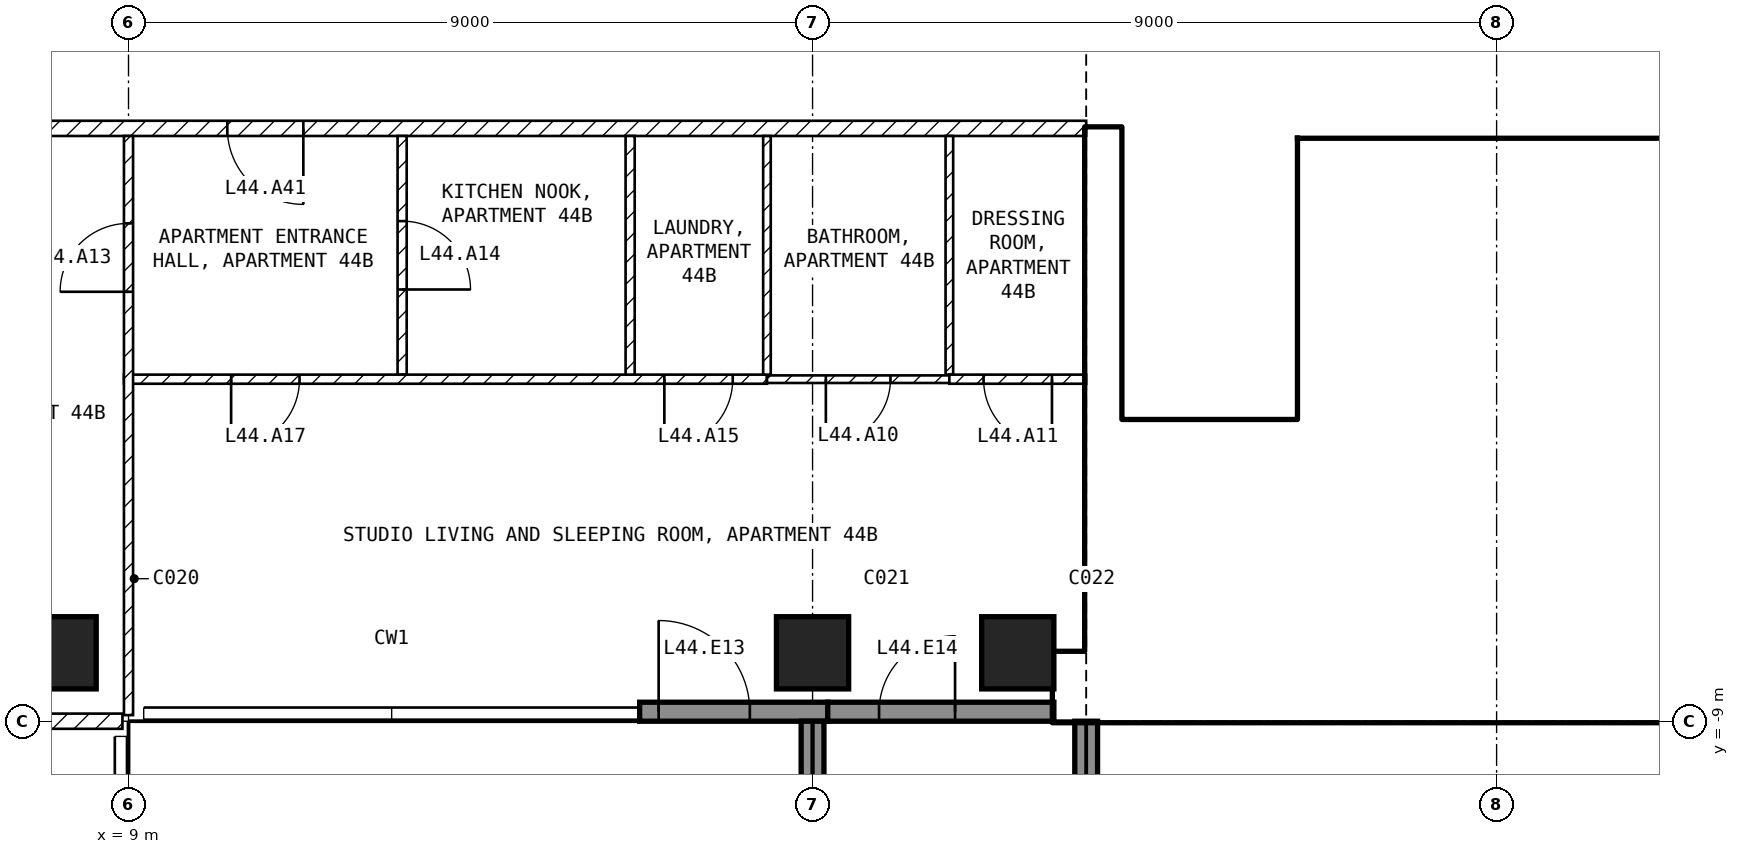
"""IFC4 building model, lengths in metres.
Left out: names, types, materials, properties, quantities, classifications, styles, units other than length and angle.
Written with IfcOpenShell. Run it as: python <this file> out.ifc"""

import sys

from ifc_helpers import new_model, si_unit, direction, frame, frame_2d, origin, origin_2d, place, context, subcontext, project, spatial, rectangle, extrude, element, fill, save


model = new_model("IFC4")
c1 = context("Model", 3, precision=1e-05, world=origin(), true_north=direction((0.0, 1.0)))
c2 = subcontext(c1, "Body", "Model", "MODEL_VIEW")
j1 = project(units=[si_unit("LENGTHUNIT", "METRE"), si_unit("PLANEANGLEUNIT", "RADIAN")], contexts=[c1])
p1 = place(None, origin())
s1 = spatial("IfcSite", under=j1, at=p1, CompositionType="ELEMENT")
p2 = place(p1, origin())
s2 = spatial("IfcBuilding", under=s1, at=p2, CompositionType="ELEMENT")
p3 = place(p2, frame((0.0, 0.0, 180.6)))
s3 = spatial("IfcBuildingStorey", under=s2, at=p3, CompositionType="ELEMENT", Elevation=180.6)
for number, where, z_axis, x_axis in (
    (1, (8.1, -8.1, -0.25), (0.0, 0.0, 1.0), (1.0, 0.0, 0.0)),
    (2, (18.0, -8.1, -0.25), (0.0, 0.0, 1.0), (1.0, 0.0, 0.0)),
    (3, (20.7, -8.1, -0.25), (0.0, 0.0, 1.0), (1.0, 0.0, 0.0)),
):
    element("IfcColumn", number, at=place(p3, frame(where, z_axis=z_axis, x_axis=x_axis)), inside=s3, PredefinedType="COLUMN", context=c2, shape_type="SweptSolid", body=[
        extrude(rectangle(XDim=0.95, YDim=0.95, at=origin_2d()), origin(), (0.0, 0.0, 1.0), 3.5),
    ])
p4 = place(p3, frame((15.725, -8.875, 0.0), z_axis=(0.0, 0.0, 1.0), x_axis=(1.0, 0.0, 0.0)))
e4 = element("IfcWall", 4, at=p4, inside=s3, PredefinedType="SOLIDWALL", context=c2, shape_type="SweptSolid", body=[
    extrude(rectangle(XDim=2.475, YDim=0.25, at=frame_2d((1.237, 0.0))), origin(), (0.0, 0.0, 1.0), 3.25),
])
p5 = place(p4, frame((0.25, 0.0, 0.0)))
e5 = element("IfcOpeningElement", 5, at=p5, cuts=e4, PredefinedType="OPENING", context=c2, shape_type="SweptSolid", body=[
    extrude(rectangle(XDim=1.2, YDim=2.4, at=frame_2d((0.6, 1.2))), frame((0.0, 0.135, 0.0), z_axis=(0.0, -1.0, 0.0), x_axis=(1.0, 0.0, 0.0)), (0.0, 0.0, 1.0), 0.27),
])
p6 = place(p3, frame((18.2, -8.875, 0.0), z_axis=(0.0, 0.0, 1.0), x_axis=(1.0, 0.0, 0.0)))
e6 = element("IfcWall", 6, at=p6, inside=s3, PredefinedType="SOLIDWALL", context=c2, shape_type="SweptSolid", body=[
    extrude(rectangle(XDim=2.975, YDim=0.25, at=frame_2d((1.488, 0.0))), origin(), (0.0, 0.0, 1.0), 3.25),
])
p7 = place(p6, frame((0.675, 0.0, 0.0)))
e7 = element("IfcOpeningElement", 7, at=p7, cuts=e6, PredefinedType="OPENING", context=c2, shape_type="SweptSolid", body=[
    extrude(rectangle(XDim=1.0, YDim=2.4, at=frame_2d((0.5, 1.2))), frame((0.0, 0.135, 0.0), z_axis=(0.0, -1.0, 0.0), x_axis=(1.0, 0.0, 0.0)), (0.0, 0.0, 1.0), 0.27),
])
for number, where, z_axis, x_axis in (
    (8, (18.0, -9.0, 0.0), (0.0, 0.0, 1.0), (0.0, -1.0, 0.0)),
    (9, (21.6, -9.0, 0.0), (0.0, 0.0, 1.0), (0.0, -1.0, 0.0)),
):
    element("IfcWall", number, at=place(p3, frame(where, z_axis=z_axis, x_axis=x_axis)), inside=s3, PredefinedType="SOLIDWALL", context=c2, shape_type="SweptSolid", body=[
        extrude(rectangle(XDim=2.7, YDim=0.3, at=frame_2d((1.35, 0.0))), origin(), (0.0, 0.0, 1.0), 3.25),
    ])
p8 = place(p3, frame((21.175, -8.55, 0.0), z_axis=(0.0, 0.0, 1.0), x_axis=(1.0, 0.0, 0.0)))
e10 = element("IfcWall", 10, at=p8, inside=s3, PredefinedType="SHEAR", context=c2, shape_type="SweptSolid", body=[
    extrude(rectangle(XDim=9.025, YDim=0.9, at=frame_2d((4.512, 0.0))), origin(), (0.0, 0.0, 1.0), 3.25),
])
p9 = place(p3, frame((21.825, -8.1, 0.0), z_axis=(0.0, 0.0, 1.0), x_axis=(0.0, 1.0, 0.0)))
e11 = element("IfcWall", 11, at=p9, inside=s3, PredefinedType="SHEAR", context=c2, shape_type="SweptSolid", body=[
    extrude(rectangle(XDim=6.9, YDim=0.45, at=frame_2d((3.45, 0.0))), origin(), (0.0, 0.0, 1.0), 3.25),
])
p10 = place(p3, frame((24.5, -5.05, 0.0), z_axis=(0.0, 0.0, 1.0), x_axis=(0.0, 1.0, 0.0)))
e12 = element("IfcWall", 12, at=p10, inside=s3, PredefinedType="SOLIDWALL", context=c2, shape_type="SweptSolid", body=[
    extrude(rectangle(XDim=3.7, YDim=0.2, at=frame_2d((1.85, 0.0))), origin(), (0.0, 0.0, 1.0), 3.25),
])
p11 = place(p10, frame((0.1, 0.0, 0.0)))
e13 = element("IfcOpeningElement", 13, at=p11, cuts=e12, PredefinedType="OPENING", context=c2, shape_type="SweptSolid", body=[
    extrude(rectangle(XDim=0.8, YDim=2.1, at=frame_2d((0.4, 1.05))), frame((0.0, 0.11, 0.0), z_axis=(0.0, -1.0, 0.0), x_axis=(1.0, 0.0, 0.0)), (0.0, 0.0, 1.0), 0.22),
])
p12 = place(p3, frame((22.05, -5.15, 0.0), z_axis=(0.0, 0.0, 1.0), x_axis=(1.0, 0.0, 0.0)))
e14 = element("IfcWall", 14, at=p12, inside=s3, PredefinedType="SOLIDWALL", context=c2, shape_type="SweptSolid", body=[
    extrude(rectangle(XDim=6.3, YDim=0.2, at=frame_2d((3.15, 0.0))), origin(), (0.0, 0.0, 1.0), 3.25),
])
p13 = place(p12, frame((0.2, 0.0, 0.0)))
e15 = element("IfcOpeningElement", 15, at=p13, cuts=e14, PredefinedType="OPENING", context=c2, shape_type="SweptSolid", body=[
    extrude(rectangle(XDim=1.0, YDim=2.1, at=frame_2d((0.5, 1.05))), frame((0.0, 0.11, 0.0), z_axis=(0.0, -1.0, 0.0), x_axis=(1.0, 0.0, 0.0)), (0.0, 0.0, 1.0), 0.22),
])
p14 = place(p3, frame((28.25, -8.1, 0.0), z_axis=(0.0, 0.0, 1.0), x_axis=(0.0, 1.0, 0.0)))
e16 = element("IfcWall", 16, at=p14, inside=s3, PredefinedType="SOLIDWALL", context=c2, shape_type="SweptSolid", body=[
    extrude(rectangle(XDim=2.85, YDim=0.2, at=frame_2d((1.425, 0.0))), origin(), (0.0, 0.0, 1.0), 3.25),
])
p15 = place(p3, frame((24.6, -1.45, 0.0), z_axis=(0.0, 0.0, 1.0), x_axis=(1.0, 0.0, 0.0)))
e17 = element("IfcWall", 17, at=p15, inside=s3, PredefinedType="SOLIDWALL", context=c2, shape_type="SweptSolid", body=[
    extrude(rectangle(XDim=8.6, YDim=0.2, at=frame_2d((4.3, 0.0))), origin(), (0.0, 0.0, 1.0), 3.25),
])
p16 = place(p15, frame((0.4, 0.0, 0.0)))
e18 = element("IfcOpeningElement", 18, at=p16, cuts=e17, PredefinedType="OPENING", context=c2, shape_type="SweptSolid", body=[
    extrude(rectangle(XDim=1.0, YDim=2.1, at=frame_2d((0.5, 1.05))), frame((0.0, 0.11, 0.0), z_axis=(0.0, -1.0, 0.0), x_axis=(1.0, 0.0, 0.0)), (0.0, 0.0, 1.0), 0.22),
])
p17 = place(p15, frame((2.4, 0.0, 0.0)))
e19 = element("IfcOpeningElement", 19, at=p17, cuts=e17, PredefinedType="OPENING", context=c2, shape_type="SweptSolid", body=[
    extrude(rectangle(XDim=1.0, YDim=2.1, at=frame_2d((0.5, 1.05))), frame((0.0, 0.11, 0.0), z_axis=(0.0, -1.0, 0.0), x_axis=(1.0, 0.0, 0.0)), (0.0, 0.0, 1.0), 0.22),
])
p18 = place(p15, frame((4.4, 0.0, 0.0)))
e20 = element("IfcOpeningElement", 20, at=p18, cuts=e17, PredefinedType="OPENING", context=c2, shape_type="SweptSolid", body=[
    extrude(rectangle(XDim=1.0, YDim=2.1, at=frame_2d((0.5, 1.05))), frame((0.0, 0.11, 0.0), z_axis=(0.0, -1.0, 0.0), x_axis=(1.0, 0.0, 0.0)), (0.0, 0.0, 1.0), 0.22),
])
p19 = place(p15, frame((6.85, 0.0, 0.0)))
e21 = element("IfcOpeningElement", 21, at=p19, cuts=e17, PredefinedType="OPENING", context=c2, shape_type="SweptSolid", body=[
    extrude(rectangle(XDim=0.9, YDim=2.1, at=frame_2d((0.45, 1.05))), frame((0.0, 0.11, 0.0), z_axis=(0.0, -1.0, 0.0), x_axis=(1.0, 0.0, 0.0)), (0.0, 0.0, 1.0), 0.22),
])
p20 = place(p3, frame((24.6, -3.95, 0.0), z_axis=(0.0, 0.0, 1.0), x_axis=(1.0, 0.0, 0.0)))
e22 = element("IfcWall", 22, at=p20, inside=s3, PredefinedType="SOLIDWALL", context=c2, shape_type="SweptSolid", body=[
    extrude(rectangle(XDim=8.6, YDim=0.2, at=frame_2d((4.3, 0.0))), origin(), (0.0, 0.0, 1.0), 3.25),
])
for number, where, z_axis, x_axis in (
    (23, (26.5, -3.85, 0.0), (0.0, 0.0, 1.0), (0.0, 1.0, 0.0)),
    (24, (28.5, -3.85, 0.0), (0.0, 0.0, 1.0), (0.0, 1.0, 0.0)),
):
    element("IfcWall", number, at=place(p3, frame(where, z_axis=z_axis, x_axis=x_axis)), inside=s3, PredefinedType="SOLIDWALL", context=c2, shape_type="SweptSolid", body=[
        extrude(rectangle(XDim=2.3, YDim=0.2, at=frame_2d((1.15, 0.0))), origin(), (0.0, 0.0, 1.0), 3.25),
    ])
p21 = place(p3, frame((21.6, -1.2, 0.0), z_axis=(0.0, 0.0, 1.0), x_axis=(-1.0, 0.0, 0.0)))
e25 = element("IfcWall", 25, at=p21, inside=s3, PredefinedType="PARTITIONING", context=c2, shape_type="SweptSolid", body=[
    extrude(rectangle(XDim=17.2, YDim=0.2, at=frame_2d((8.6, 0.0))), origin(), (0.0, 0.0, 1.0), 3.25),
])
p22 = place(p21, frame((10.3, 0.0, 0.0)))
e26 = element("IfcOpeningElement", 26, at=p22, cuts=e25, PredefinedType="OPENING", context=c2, shape_type="SweptSolid", body=[
    extrude(rectangle(XDim=1.0, YDim=2.1, at=frame_2d((0.5, 1.05))), frame((0.0, 0.11, 0.0), z_axis=(0.0, -1.0, 0.0), x_axis=(1.0, 0.0, 0.0)), (0.0, 0.0, 1.0), 0.22),
])
p23 = place(p3, frame((8.92, -9.0, 0.0), z_axis=(0.0, 0.0, 1.0), x_axis=(-1.0, 0.0, 0.0)))
e27 = element("IfcWall", 27, at=p23, inside=s3, PredefinedType="PARTITIONING", context=c2, shape_type="SweptSolid", body=[
    extrude(rectangle(XDim=17.84, YDim=0.2, at=frame_2d((8.92, 0.0))), origin(), (0.0, 0.0, 1.0), 3.25),
])
p24 = place(p23, frame((8.42, 0.0, 0.0)))
e28 = element("IfcOpeningElement", 28, at=p24, cuts=e27, PredefinedType="OPENING", context=c2, shape_type="SweptSolid", body=[
    extrude(rectangle(XDim=1.0, YDim=2.1, at=frame_2d((0.5, 1.05))), frame((0.0, 0.11, 0.0), z_axis=(0.0, -1.0, 0.0), x_axis=(1.0, 0.0, 0.0)), (0.0, 0.0, 1.0), 0.22),
])
p25 = place(p3, frame((12.6, -1.3, 0.0), z_axis=(0.0, 0.0, 1.0), x_axis=(0.0, -1.0, 0.0)))
e29 = element("IfcWall", 29, at=p25, inside=s3, PredefinedType="PARTITIONING", context=c2, shape_type="SweptSolid", body=[
    extrude(rectangle(XDim=3.14, YDim=0.12, at=frame_2d((1.57, 0.0))), origin(), (0.0, 0.0, 1.0), 3.25),
])
p26 = place(p25, frame((1.12, 0.0, 0.0)))
e30 = element("IfcOpeningElement", 30, at=p26, cuts=e29, PredefinedType="OPENING", context=c2, shape_type="SweptSolid", body=[
    extrude(rectangle(XDim=0.9, YDim=2.1, at=frame_2d((0.45, 1.05))), frame((0.0, 0.07, 0.0), z_axis=(0.0, -1.0, 0.0), x_axis=(1.0, 0.0, 0.0)), (0.0, 0.0, 1.0), 0.14),
])
p27 = place(p3, frame((17.4, -4.5, 0.0), z_axis=(0.0, 0.0, 1.0), x_axis=(-1.0, 0.0, 0.0)))
e31 = element("IfcWall", 31, at=p27, inside=s3, PredefinedType="PARTITIONING", context=c2, shape_type="SweptSolid", body=[
    extrude(rectangle(XDim=8.46, YDim=0.12, at=frame_2d((4.23, 0.0))), origin(), (0.0, 0.0, 1.0), 3.25),
])
p28 = place(p27, frame((0.45, 0.0, 0.0)))
e32 = element("IfcOpeningElement", 32, at=p28, cuts=e31, PredefinedType="OPENING", context=c2, shape_type="SweptSolid", body=[
    extrude(rectangle(XDim=0.9, YDim=2.1, at=frame_2d((0.45, 1.05))), frame((0.0, 0.07, 0.0), z_axis=(0.0, -1.0, 0.0), x_axis=(1.0, 0.0, 0.0)), (0.0, 0.0, 1.0), 0.14),
])
p29 = place(p27, frame((6.15, 0.0, 0.0)))
e33 = element("IfcOpeningElement", 33, at=p29, cuts=e31, PredefinedType="OPENING", context=c2, shape_type="SweptSolid", body=[
    extrude(rectangle(XDim=0.9, YDim=2.1, at=frame_2d((0.45, 1.05))), frame((0.0, 0.07, 0.0), z_axis=(0.0, -1.0, 0.0), x_axis=(1.0, 0.0, 0.0)), (0.0, 0.0, 1.0), 0.14),
])
p30 = place(p3, frame((9.0, -8.92, 0.0), z_axis=(0.0, 0.0, 1.0), x_axis=(0.0, 1.0, 0.0)))
e34 = element("IfcWall", 34, at=p30, inside=s3, PredefinedType="PARTITIONING", context=c2, shape_type="SweptSolid", body=[
    extrude(rectangle(XDim=7.62, YDim=0.12, at=frame_2d((3.81, 0.0))), origin(), (0.0, 0.0, 1.0), 3.25),
])
p31 = place(p30, frame((5.57, 0.0, 0.0)))
e35 = element("IfcOpeningElement", 35, at=p31, cuts=e34, PredefinedType="OPENING", context=c2, shape_type="SweptSolid", body=[
    extrude(rectangle(XDim=0.9, YDim=2.1, at=frame_2d((0.45, 1.05))), frame((0.0, 0.07, 0.0), z_axis=(0.0, -1.0, 0.0), x_axis=(1.0, 0.0, 0.0)), (0.0, 0.0, 1.0), 0.14),
])
p32 = place(p3, frame((15.6, -1.3, 0.0), z_axis=(0.0, 0.0, 1.0), x_axis=(0.0, -1.0, 0.0)))
e36 = element("IfcWall", 36, at=p32, inside=s3, PredefinedType="PARTITIONING", context=c2, shape_type="SweptSolid", body=[
    extrude(rectangle(XDim=3.14, YDim=0.12, at=frame_2d((1.57, 0.0))), origin(), (0.0, 0.0, 1.0), 3.25),
])
for number, where, z_axis, x_axis in (
    (37, (17.4, -1.3, 0.0), (0.0, 0.0, 1.0), (0.0, -1.0, 0.0)),
    (38, (19.8, -1.3, 0.0), (0.0, 0.0, 1.0), (0.0, -1.0, 0.0)),
):
    element("IfcWall", number, at=place(p3, frame(where, z_axis=z_axis, x_axis=x_axis)), inside=s3, PredefinedType="PARTITIONING", context=c2, shape_type="SweptSolid", body=[
        extrude(rectangle(XDim=3.14, YDim=0.1, at=frame_2d((1.57, 0.0))), origin(), (0.0, 0.0, 1.0), 3.25),
    ])
p33 = place(p3, frame((19.8, -4.5, 0.0), z_axis=(0.0, 0.0, 1.0), x_axis=(-1.0, 0.0, 0.0)))
e39 = element("IfcWall", 39, at=p33, inside=s3, PredefinedType="PARTITIONING", context=c2, shape_type="SweptSolid", body=[
    extrude(rectangle(XDim=2.4, YDim=0.1, at=frame_2d((1.2, 0.0))), origin(), (0.0, 0.0, 1.0), 3.25),
])
p34 = place(p33, frame((0.775, 0.0, 0.0)))
e40 = element("IfcOpeningElement", 40, at=p34, cuts=e39, PredefinedType="OPENING", context=c2, shape_type="SweptSolid", body=[
    extrude(rectangle(XDim=0.85, YDim=2.1, at=frame_2d((0.425, 1.05))), frame((0.0, 0.06, 0.0), z_axis=(0.0, -1.0, 0.0), x_axis=(1.0, 0.0, 0.0)), (0.0, 0.0, 1.0), 0.12),
])
p35 = place(p3, frame((21.6, -4.5, 0.0), z_axis=(0.0, 0.0, 1.0), x_axis=(-1.0, 0.0, 0.0)))
e41 = element("IfcWall", 41, at=p35, inside=s3, PredefinedType="PARTITIONING", context=c2, shape_type="SweptSolid", body=[
    extrude(rectangle(XDim=1.8, YDim=0.12, at=frame_2d((0.9, 0.0))), origin(), (0.0, 0.0, 1.0), 3.25),
])
p36 = place(p35, frame((0.45, 0.0, 0.0)))
e42 = element("IfcOpeningElement", 42, at=p36, cuts=e41, PredefinedType="OPENING", context=c2, shape_type="SweptSolid", body=[
    extrude(rectangle(XDim=0.9, YDim=2.1, at=frame_2d((0.45, 1.05))), frame((0.0, 0.07, 0.0), z_axis=(0.0, -1.0, 0.0), x_axis=(1.0, 0.0, 0.0)), (0.0, 0.0, 1.0), 0.14),
])
p37 = place(p5, origin())
e43 = element("IfcDoor", 43, at=p37, inside=s3, OperationType="SINGLE_SWING_LEFT", PredefinedType="DOOR", context=c2, shape_type="SweptSolid", body=[
    extrude(rectangle(XDim=1.2, YDim=2.4, at=frame_2d((0.6, 1.2))), frame((0.0, 0.025, 0.0), z_axis=(0.0, -1.0, 0.0), x_axis=(1.0, 0.0, 0.0)), (0.0, 0.0, 1.0), 0.05),
])
fill(e5, e43)
p38 = place(p7, origin())
e44 = element("IfcDoor", 44, at=p38, inside=s3, OperationType="SINGLE_SWING_RIGHT", PredefinedType="DOOR", context=c2, shape_type="SweptSolid", body=[
    extrude(rectangle(XDim=1.0, YDim=2.4, at=frame_2d((0.5, 1.2))), frame((0.0, 0.025, 0.0), z_axis=(0.0, -1.0, 0.0), x_axis=(1.0, 0.0, 0.0)), (0.0, 0.0, 1.0), 0.05),
])
fill(e7, e44)
p39 = place(p16, origin())
e45 = element("IfcDoor", 45, at=p39, inside=s3, OperationType="DOUBLE_DOOR_SLIDING", PredefinedType="DOOR", context=c2, shape_type="SweptSolid", body=[
    extrude(rectangle(XDim=1.0, YDim=2.1, at=frame_2d((0.5, 1.05))), frame((0.0, 0.025, 0.0), z_axis=(0.0, -1.0, 0.0), x_axis=(1.0, 0.0, 0.0)), (0.0, 0.0, 1.0), 0.05),
])
fill(e18, e45)
p40 = place(p17, origin())
e46 = element("IfcDoor", 46, at=p40, inside=s3, OperationType="DOUBLE_DOOR_SLIDING", PredefinedType="DOOR", context=c2, shape_type="SweptSolid", body=[
    extrude(rectangle(XDim=1.0, YDim=2.1, at=frame_2d((0.5, 1.05))), frame((0.0, 0.025, 0.0), z_axis=(0.0, -1.0, 0.0), x_axis=(1.0, 0.0, 0.0)), (0.0, 0.0, 1.0), 0.05),
])
fill(e19, e46)
p41 = place(p18, origin())
e47 = element("IfcDoor", 47, at=p41, inside=s3, OperationType="DOUBLE_DOOR_SLIDING", PredefinedType="DOOR", context=c2, shape_type="SweptSolid", body=[
    extrude(rectangle(XDim=1.0, YDim=2.1, at=frame_2d((0.5, 1.05))), frame((0.0, 0.025, 0.0), z_axis=(0.0, -1.0, 0.0), x_axis=(1.0, 0.0, 0.0)), (0.0, 0.0, 1.0), 0.05),
])
fill(e20, e47)
p42 = place(p13, origin())
e48 = element("IfcDoor", 48, at=p42, inside=s3, OperationType="SINGLE_SWING_LEFT", PredefinedType="DOOR", context=c2, shape_type="SweptSolid", body=[
    extrude(rectangle(XDim=1.0, YDim=2.1, at=frame_2d((0.5, 1.05))), frame((0.0, 0.025, 0.0), z_axis=(0.0, -1.0, 0.0), x_axis=(1.0, 0.0, 0.0)), (0.0, 0.0, 1.0), 0.05),
])
fill(e15, e48)
p43 = place(p11, origin())
e49 = element("IfcDoor", 49, at=p43, inside=s3, OperationType="SINGLE_SWING_LEFT", PredefinedType="DOOR", context=c2, shape_type="SweptSolid", body=[
    extrude(rectangle(XDim=0.8, YDim=2.1, at=frame_2d((0.4, 1.05))), frame((0.0, 0.025, 0.0), z_axis=(0.0, -1.0, 0.0), x_axis=(1.0, 0.0, 0.0)), (0.0, 0.0, 1.0), 0.05),
])
fill(e13, e49)
p44 = place(p34, origin())
e50 = element("IfcDoor", 50, at=p44, inside=s3, OperationType="SINGLE_SWING_RIGHT", PredefinedType="DOOR", context=c2, shape_type="SweptSolid", body=[
    extrude(rectangle(XDim=0.85, YDim=2.1, at=frame_2d((0.425, 1.05))), frame((0.0, 0.025, 0.0), z_axis=(0.0, -1.0, 0.0), x_axis=(1.0, 0.0, 0.0)), (0.0, 0.0, 1.0), 0.05),
])
fill(e40, e50)
p45 = place(p36, origin())
e51 = element("IfcDoor", 51, at=p45, inside=s3, OperationType="SINGLE_SWING_LEFT", PredefinedType="DOOR", context=c2, shape_type="SweptSolid", body=[
    extrude(rectangle(XDim=0.9, YDim=2.1, at=frame_2d((0.45, 1.05))), frame((0.0, 0.025, 0.0), z_axis=(0.0, -1.0, 0.0), x_axis=(1.0, 0.0, 0.0)), (0.0, 0.0, 1.0), 0.05),
])
fill(e42, e51)
p46 = place(p31, origin())
e52 = element("IfcDoor", 52, at=p46, inside=s3, OperationType="SINGLE_SWING_LEFT", PredefinedType="DOOR", context=c2, shape_type="SweptSolid", body=[
    extrude(rectangle(XDim=0.9, YDim=2.1, at=frame_2d((0.45, 1.05))), frame((0.0, 0.025, 0.0), z_axis=(0.0, -1.0, 0.0), x_axis=(1.0, 0.0, 0.0)), (0.0, 0.0, 1.0), 0.05),
])
fill(e35, e52)
p47 = place(p26, origin())
e53 = element("IfcDoor", 53, at=p47, inside=s3, OperationType="SINGLE_SWING_RIGHT", PredefinedType="DOOR", context=c2, shape_type="SweptSolid", body=[
    extrude(rectangle(XDim=0.9, YDim=2.1, at=frame_2d((0.45, 1.05))), frame((0.0, 0.025, 0.0), z_axis=(0.0, -1.0, 0.0), x_axis=(1.0, 0.0, 0.0)), (0.0, 0.0, 1.0), 0.05),
])
fill(e30, e53)
p48 = place(p28, origin())
e54 = element("IfcDoor", 54, at=p48, inside=s3, OperationType="SINGLE_SWING_RIGHT", PredefinedType="DOOR", context=c2, shape_type="SweptSolid", body=[
    extrude(rectangle(XDim=0.9, YDim=2.1, at=frame_2d((0.45, 1.05))), frame((0.0, 0.025, 0.0), z_axis=(0.0, -1.0, 0.0), x_axis=(1.0, 0.0, 0.0)), (0.0, 0.0, 1.0), 0.05),
])
fill(e32, e54)
p49 = place(p29, origin())
e55 = element("IfcDoor", 55, at=p49, inside=s3, OperationType="SINGLE_SWING_RIGHT", PredefinedType="DOOR", context=c2, shape_type="SweptSolid", body=[
    extrude(rectangle(XDim=0.9, YDim=2.1, at=frame_2d((0.45, 1.05))), frame((0.0, 0.025, 0.0), z_axis=(0.0, -1.0, 0.0), x_axis=(1.0, 0.0, 0.0)), (0.0, 0.0, 1.0), 0.05),
])
fill(e33, e55)
p50 = place(p22, origin())
e56 = element("IfcDoor", 56, at=p50, inside=s3, OperationType="SINGLE_SWING_LEFT", PredefinedType="DOOR", context=c2, shape_type="SweptSolid", body=[
    extrude(rectangle(XDim=1.0, YDim=2.1, at=frame_2d((0.5, 1.05))), frame((0.0, 0.025, 0.0), z_axis=(0.0, -1.0, 0.0), x_axis=(1.0, 0.0, 0.0)), (0.0, 0.0, 1.0), 0.05),
])
fill(e26, e56)
save(model, sys.argv[1])
